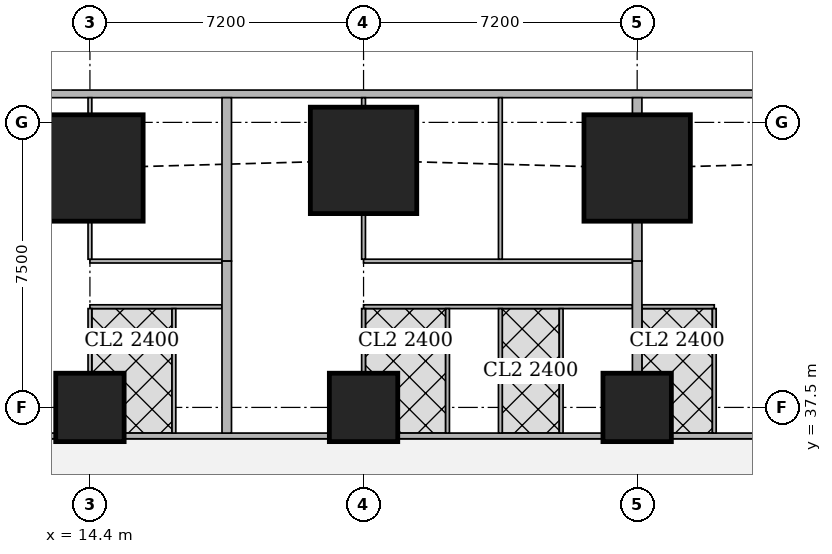
"""IFC4 building model, lengths in metres.
Left out: names, types, materials, properties, quantities, classifications, styles, units other than length and angle.
Written with IfcOpenShell. Run it as: python <this file> out.ifc"""

import sys

from ifc_helpers import new_model, si_unit, direction, frame, frame_2d, origin, origin_2d, place, context, subcontext, project, spatial, rectangle, extrude, element, fill, save


model = new_model("IFC4")
c1 = context("Model", 3, precision=1e-05, world=origin(), true_north=direction((0.0, 1.0)))
c2 = subcontext(c1, "Body", "Model", "MODEL_VIEW")
j1 = project(units=[si_unit("LENGTHUNIT", "METRE"), si_unit("PLANEANGLEUNIT", "RADIAN")], contexts=[c1])
p1 = place(None, origin())
s1 = spatial("IfcSite", under=j1, at=p1, CompositionType="ELEMENT")
p2 = place(p1, origin())
s2 = spatial("IfcBuilding", under=s1, at=p2, CompositionType="ELEMENT")
p3 = place(p2, frame((0.0, 0.0, 53.75)))
s3 = spatial("IfcBuildingStorey", under=s2, at=p3, CompositionType="ELEMENT", Elevation=53.75)
for number, where, z_axis, x_axis in (
    (1, (14.4, 37.5, 0.0), (0.0, 0.0, 1.0), (1.0, 0.0, 0.0)),
    (2, (21.6, 37.5, 0.0), (0.0, 0.0, 1.0), (1.0, 0.0, 0.0)),
    (3, (28.8, 37.5, 0.0), (0.0, 0.0, 1.0), (1.0, 0.0, 0.0)),
):
    element("IfcColumn", number, at=place(p3, frame(where, z_axis=z_axis, x_axis=x_axis)), inside=s3, PredefinedType="COLUMN", context=c2, shape_type="SweptSolid", body=[
        extrude(rectangle(XDim=1.8, YDim=1.8, at=origin_2d()), origin(), (0.0, 0.0, 1.0), 3.75),
    ])
for number, where, z_axis, x_axis in (
    (4, (14.4, 43.8, 0.0), (0.0, 0.0, 1.0), (1.0, 0.0, 0.0)),
    (5, (21.6, 44.0, 0.0), (0.0, 0.0, 1.0), (1.0, 0.0, 0.0)),
    (6, (28.8, 43.8, 0.0), (0.0, 0.0, 1.0), (1.0, 0.0, 0.0)),
):
    element("IfcColumn", number, at=place(p3, frame(where, z_axis=z_axis, x_axis=x_axis)), inside=s3, PredefinedType="COLUMN", context=c2, shape_type="SweptSolid", body=[
        extrude(rectangle(XDim=2.8, YDim=2.8, at=origin_2d()), origin(), (0.0, 0.0, 1.0), 3.75),
    ])
p4 = place(p3, frame((40.106, 45.75, 0.0), z_axis=(0.0, 0.0, 1.0), x_axis=(-1.0, 0.0, 0.0)))
e7 = element("IfcWall", 7, at=p4, inside=s3, PredefinedType="SOLIDWALL", context=c2, shape_type="SweptSolid", body=[
    extrude(rectangle(XDim=37.943, YDim=0.2, at=frame_2d((18.971, 0.0))), origin(), (0.0, 0.0, 1.0), 3.5),
])
p5 = place(p4, frame((8.606, 0.0, 0.9)))
e8 = element("IfcOpeningElement", 8, at=p5, cuts=e7, PredefinedType="OPENING", context=c2, shape_type="SweptSolid", body=[
    extrude(rectangle(XDim=1.8, YDim=1.5, at=frame_2d((0.9, 0.75))), frame((0.0, 0.11, 0.0), z_axis=(0.0, -1.0, 0.0), x_axis=(1.0, 0.0, 0.0)), (0.0, 0.0, 1.0), 0.22),
])
p6 = place(p4, frame((12.206, 0.0, 0.9)))
e9 = element("IfcOpeningElement", 9, at=p6, cuts=e7, PredefinedType="OPENING", context=c2, shape_type="SweptSolid", body=[
    extrude(rectangle(XDim=1.8, YDim=1.5, at=frame_2d((0.9, 0.75))), frame((0.0, 0.11, 0.0), z_axis=(0.0, -1.0, 0.0), x_axis=(1.0, 0.0, 0.0)), (0.0, 0.0, 1.0), 0.22),
])
p7 = place(p4, frame((15.806, 0.0, 0.9)))
e10 = element("IfcOpeningElement", 10, at=p7, cuts=e7, PredefinedType="OPENING", context=c2, shape_type="SweptSolid", body=[
    extrude(rectangle(XDim=1.8, YDim=1.5, at=frame_2d((0.9, 0.75))), frame((0.0, 0.11, 0.0), z_axis=(0.0, -1.0, 0.0), x_axis=(1.0, 0.0, 0.0)), (0.0, 0.0, 1.0), 0.22),
])
p8 = place(p4, frame((19.406, 0.0, 0.9)))
e11 = element("IfcOpeningElement", 11, at=p8, cuts=e7, PredefinedType="OPENING", context=c2, shape_type="SweptSolid", body=[
    extrude(rectangle(XDim=1.8, YDim=1.5, at=frame_2d((0.9, 0.75))), frame((0.0, 0.11, 0.0), z_axis=(0.0, -1.0, 0.0), x_axis=(1.0, 0.0, 0.0)), (0.0, 0.0, 1.0), 0.22),
])
p9 = place(p4, frame((23.006, 0.0, 0.9)))
e12 = element("IfcOpeningElement", 12, at=p9, cuts=e7, PredefinedType="OPENING", context=c2, shape_type="SweptSolid", body=[
    extrude(rectangle(XDim=1.8, YDim=1.5, at=frame_2d((0.9, 0.75))), frame((0.0, 0.11, 0.0), z_axis=(0.0, -1.0, 0.0), x_axis=(1.0, 0.0, 0.0)), (0.0, 0.0, 1.0), 0.22),
])
p10 = place(p4, frame((26.606, 0.0, 0.9)))
e13 = element("IfcOpeningElement", 13, at=p10, cuts=e7, PredefinedType="OPENING", context=c2, shape_type="SweptSolid", body=[
    extrude(rectangle(XDim=1.8, YDim=1.5, at=frame_2d((0.9, 0.75))), frame((0.0, 0.11, 0.0), z_axis=(0.0, -1.0, 0.0), x_axis=(1.0, 0.0, 0.0)), (0.0, 0.0, 1.0), 0.22),
])
p11 = place(p3, frame((8.1, 36.75, 0.0), z_axis=(0.0, 0.0, 1.0), x_axis=(1.0, 0.0, 0.0)))
e14 = element("IfcWall", 14, at=p11, inside=s3, PredefinedType="SOLIDWALL", context=c2, shape_type="SweptSolid", body=[
    extrude(rectangle(XDim=5.399, YDim=0.15, at=frame_2d((2.699, 0.0))), origin(), (0.0, 0.0, 1.0), 3.5),
])
p12 = place(p11, frame((2.725, 0.0, 0.0)))
e15 = element("IfcOpeningElement", 15, at=p12, cuts=e14, PredefinedType="OPENING", context=c2, shape_type="SweptSolid", body=[
    extrude(rectangle(XDim=1.0, YDim=2.1, at=frame_2d((0.5, 1.05))), frame((0.0, 0.085, 0.0), z_axis=(0.0, -1.0, 0.0), x_axis=(1.0, 0.0, 0.0)), (0.0, 0.0, 1.0), 0.17),
])
p13 = place(p3, frame((15.301, 36.75, 0.0), z_axis=(0.0, 0.0, 1.0), x_axis=(1.0, 0.0, 0.0)))
e16 = element("IfcWall", 16, at=p13, inside=s3, PredefinedType="SOLIDWALL", context=c2, shape_type="SweptSolid", body=[
    extrude(rectangle(XDim=5.398, YDim=0.15, at=frame_2d((2.699, 0.0))), origin(), (0.0, 0.0, 1.0), 3.5),
])
p14 = place(p13, frame((3.599, 0.0, 0.0)))
e17 = element("IfcOpeningElement", 17, at=p14, cuts=e16, PredefinedType="OPENING", context=c2, shape_type="SweptSolid", body=[
    extrude(rectangle(XDim=1.0, YDim=2.1, at=frame_2d((0.5, 1.05))), frame((0.0, 0.085, 0.0), z_axis=(0.0, -1.0, 0.0), x_axis=(1.0, 0.0, 0.0)), (0.0, 0.0, 1.0), 0.17),
])
p15 = place(p3, frame((22.501, 36.75, 0.0), z_axis=(0.0, 0.0, 1.0), x_axis=(1.0, 0.0, 0.0)))
e18 = element("IfcWall", 18, at=p15, inside=s3, PredefinedType="SOLIDWALL", context=c2, shape_type="SweptSolid", body=[
    extrude(rectangle(XDim=5.398, YDim=0.15, at=frame_2d((2.699, 0.0))), origin(), (0.0, 0.0, 1.0), 3.5),
])
p16 = place(p3, frame((29.701, 36.75, 0.0), z_axis=(0.0, 0.0, 1.0), x_axis=(1.0, 0.0, 0.0)))
e19 = element("IfcWall", 19, at=p16, inside=s3, PredefinedType="SOLIDWALL", context=c2, shape_type="SweptSolid", body=[
    extrude(rectangle(XDim=5.399, YDim=0.15, at=frame_2d((2.7, 0.0))), origin(), (0.0, 0.0, 1.0), 3.5),
])
p17 = place(p16, frame((2.745, 0.0, 0.0)))
e20 = element("IfcOpeningElement", 20, at=p17, cuts=e19, PredefinedType="OPENING", context=c2, shape_type="SweptSolid", body=[
    extrude(rectangle(XDim=1.0, YDim=2.1, at=frame_2d((0.5, 1.05))), frame((0.0, 0.085, 0.0), z_axis=(0.0, -1.0, 0.0), x_axis=(1.0, 0.0, 0.0)), (0.0, 0.0, 1.0), 0.17),
])
p18 = place(p3, frame((14.4, 41.35, 0.0), z_axis=(0.0, 0.0, 1.0), x_axis=(1.0, 0.0, 0.0)))
e21 = element("IfcWall", 21, at=p18, inside=s3, PredefinedType="PARTITIONING", context=c2, shape_type="SweptSolid", body=[
    extrude(rectangle(XDim=3.475, YDim=0.1, at=frame_2d((1.738, 0.0))), origin(), (0.0, 0.0, 1.0), 3.5),
])
p19 = place(p18, frame((1.45, 0.0, 0.0)))
e22 = element("IfcOpeningElement", 22, at=p19, cuts=e21, PredefinedType="OPENING", context=c2, shape_type="SweptSolid", body=[
    extrude(rectangle(XDim=0.9, YDim=2.1, at=frame_2d((0.45, 1.05))), frame((0.0, 0.06, 0.0), z_axis=(0.0, -1.0, 0.0), x_axis=(1.0, 0.0, 0.0)), (0.0, 0.0, 1.0), 0.12),
])
p20 = place(p3, frame((14.4, 40.15, 0.0), z_axis=(0.0, 0.0, 1.0), x_axis=(1.0, 0.0, 0.0)))
e23 = element("IfcWall", 23, at=p20, inside=s3, PredefinedType="PARTITIONING", context=c2, shape_type="SweptSolid", body=[
    extrude(rectangle(XDim=3.475, YDim=0.1, at=frame_2d((1.738, 0.0))), origin(), (0.0, 0.0, 1.0), 3.5),
])
p21 = place(p20, frame((0.655, 0.0, 0.0)))
e24 = element("IfcOpeningElement", 24, at=p21, cuts=e23, PredefinedType="OPENING", context=c2, shape_type="SweptSolid", body=[
    extrude(rectangle(XDim=0.9, YDim=2.1, at=frame_2d((0.45, 1.05))), frame((0.0, 0.06, 0.0), z_axis=(0.0, -1.0, 0.0), x_axis=(1.0, 0.0, 0.0)), (0.0, 0.0, 1.0), 0.12),
])
p22 = place(p20, frame((2.425, 0.0, 0.0)))
e25 = element("IfcOpeningElement", 25, at=p22, cuts=e23, PredefinedType="OPENING", context=c2, shape_type="SweptSolid", body=[
    extrude(rectangle(XDim=0.9, YDim=2.1, at=frame_2d((0.45, 1.05))), frame((0.0, 0.06, 0.0), z_axis=(0.0, -1.0, 0.0), x_axis=(1.0, 0.0, 0.0)), (0.0, 0.0, 1.0), 0.12),
])
p23 = place(p3, frame((14.4, 41.4, 0.0), z_axis=(0.0, 0.0, 1.0), x_axis=(0.0, 1.0, 0.0)))
e26 = element("IfcWall", 26, at=p23, inside=s3, PredefinedType="PARTITIONING", context=c2, shape_type="SweptSolid", body=[
    extrude(rectangle(XDim=0.999, YDim=0.1, at=frame_2d((0.5, 0.0))), origin(), (0.0, 0.0, 1.0), 3.5),
])
p24 = place(p3, frame((14.4, 45.201, 0.0), z_axis=(0.0, 0.0, 1.0), x_axis=(0.0, 1.0, 0.0)))
e27 = element("IfcWall", 27, at=p24, inside=s3, PredefinedType="PARTITIONING", context=c2, shape_type="SweptSolid", body=[
    extrude(rectangle(XDim=0.449, YDim=0.1, at=frame_2d((0.225, 0.0))), origin(), (0.0, 0.0, 1.0), 3.5),
])
p25 = place(p3, frame((14.4, 38.401, 0.0), z_axis=(0.0, 0.0, 1.0), x_axis=(0.0, 1.0, 0.0)))
e28 = element("IfcWall", 28, at=p25, inside=s3, PredefinedType="PARTITIONING", context=c2, shape_type="SweptSolid", body=[
    extrude(rectangle(XDim=1.699, YDim=0.1, at=frame_2d((0.85, 0.0))), origin(), (0.0, 0.0, 1.0), 3.5),
])
p26 = place(p3, frame((16.61, 36.825, 0.0), z_axis=(0.0, 0.0, 1.0), x_axis=(0.0, 1.0, 0.0)))
e29 = element("IfcWall", 29, at=p26, inside=s3, PredefinedType="PARTITIONING", context=c2, shape_type="SweptSolid", body=[
    extrude(rectangle(XDim=3.275, YDim=0.1, at=frame_2d((1.638, 0.0))), origin(), (0.0, 0.0, 1.0), 3.5),
])
p27 = place(p3, frame((21.6, 41.35, 0.0), z_axis=(0.0, 0.0, 1.0), x_axis=(1.0, 0.0, 0.0)))
e30 = element("IfcWall", 30, at=p27, inside=s3, PredefinedType="PARTITIONING", context=c2, shape_type="SweptSolid", body=[
    extrude(rectangle(XDim=7.075, YDim=0.1, at=frame_2d((3.538, 0.0))), origin(), (0.0, 0.0, 1.0), 3.5),
])
p28 = place(p27, frame((1.45, 0.0, 0.0)))
e31 = element("IfcOpeningElement", 31, at=p28, cuts=e30, PredefinedType="OPENING", context=c2, shape_type="SweptSolid", body=[
    extrude(rectangle(XDim=0.9, YDim=2.1, at=frame_2d((0.45, 1.05))), frame((0.0, 0.06, 0.0), z_axis=(0.0, -1.0, 0.0), x_axis=(1.0, 0.0, 0.0)), (0.0, 0.0, 1.0), 0.12),
])
p29 = place(p27, frame((3.8, 0.0, 0.0)))
e32 = element("IfcOpeningElement", 32, at=p29, cuts=e30, PredefinedType="OPENING", context=c2, shape_type="SweptSolid", body=[
    extrude(rectangle(XDim=0.9, YDim=2.1, at=frame_2d((0.45, 1.05))), frame((0.0, 0.06, 0.0), z_axis=(0.0, -1.0, 0.0), x_axis=(1.0, 0.0, 0.0)), (0.0, 0.0, 1.0), 0.12),
])
p30 = place(p3, frame((21.6, 40.15, 0.0), z_axis=(0.0, 0.0, 1.0), x_axis=(1.0, 0.0, 0.0)))
e33 = element("IfcWall", 33, at=p30, inside=s3, PredefinedType="PARTITIONING", context=c2, shape_type="SweptSolid", body=[
    extrude(rectangle(XDim=7.075, YDim=0.1, at=frame_2d((3.538, 0.0))), origin(), (0.0, 0.0, 1.0), 3.5),
])
p31 = place(p30, frame((0.655, 0.0, 0.0)))
e34 = element("IfcOpeningElement", 34, at=p31, cuts=e33, PredefinedType="OPENING", context=c2, shape_type="SweptSolid", body=[
    extrude(rectangle(XDim=0.9, YDim=2.1, at=frame_2d((0.45, 1.05))), frame((0.0, 0.06, 0.0), z_axis=(0.0, -1.0, 0.0), x_axis=(1.0, 0.0, 0.0)), (0.0, 0.0, 1.0), 0.12),
])
p32 = place(p30, frame((3.95, 0.0, 0.0)))
e35 = element("IfcOpeningElement", 35, at=p32, cuts=e33, PredefinedType="OPENING", context=c2, shape_type="SweptSolid", body=[
    extrude(rectangle(XDim=0.9, YDim=2.1, at=frame_2d((0.45, 1.05))), frame((0.0, 0.06, 0.0), z_axis=(0.0, -1.0, 0.0), x_axis=(1.0, 0.0, 0.0)), (0.0, 0.0, 1.0), 0.12),
])
p33 = place(p30, frame((2.455, 0.0, 0.0)))
e36 = element("IfcOpeningElement", 36, at=p33, cuts=e33, PredefinedType="OPENING", context=c2, shape_type="SweptSolid", body=[
    extrude(rectangle(XDim=0.9, YDim=2.1, at=frame_2d((0.45, 1.05))), frame((0.0, 0.06, 0.0), z_axis=(0.0, -1.0, 0.0), x_axis=(1.0, 0.0, 0.0)), (0.0, 0.0, 1.0), 0.12),
])
p34 = place(p30, frame((5.75, 0.0, 0.0)))
e37 = element("IfcOpeningElement", 37, at=p34, cuts=e33, PredefinedType="OPENING", context=c2, shape_type="SweptSolid", body=[
    extrude(rectangle(XDim=0.9, YDim=2.1, at=frame_2d((0.45, 1.05))), frame((0.0, 0.06, 0.0), z_axis=(0.0, -1.0, 0.0), x_axis=(1.0, 0.0, 0.0)), (0.0, 0.0, 1.0), 0.12),
])
p35 = place(p3, frame((21.6, 41.4, 0.0), z_axis=(0.0, 0.0, 1.0), x_axis=(0.0, 1.0, 0.0)))
e38 = element("IfcWall", 38, at=p35, inside=s3, PredefinedType="PARTITIONING", context=c2, shape_type="SweptSolid", body=[
    extrude(rectangle(XDim=1.199, YDim=0.1, at=frame_2d((0.6, 0.0))), origin(), (0.0, 0.0, 1.0), 3.5),
])
p36 = place(p3, frame((21.6, 45.401, 0.0), z_axis=(0.0, 0.0, 1.0), x_axis=(0.0, 1.0, 0.0)))
e39 = element("IfcWall", 39, at=p36, inside=s3, PredefinedType="PARTITIONING", context=c2, shape_type="SweptSolid", body=[
    extrude(rectangle(XDim=0.249, YDim=0.1, at=frame_2d((0.125, 0.0))), origin(), (0.0, 0.0, 1.0), 3.5),
])
p37 = place(p3, frame((25.2, 41.4, 0.0), z_axis=(0.0, 0.0, 1.0), x_axis=(0.0, 1.0, 0.0)))
e40 = element("IfcWall", 40, at=p37, inside=s3, PredefinedType="PARTITIONING", context=c2, shape_type="SweptSolid", body=[
    extrude(rectangle(XDim=4.25, YDim=0.1, at=frame_2d((2.125, 0.0))), origin(), (0.0, 0.0, 1.0), 2.05),
])
p38 = place(p3, frame((21.6, 38.401, 0.0), z_axis=(0.0, 0.0, 1.0), x_axis=(0.0, 1.0, 0.0)))
e41 = element("IfcWall", 41, at=p38, inside=s3, PredefinedType="PARTITIONING", context=c2, shape_type="SweptSolid", body=[
    extrude(rectangle(XDim=1.699, YDim=0.1, at=frame_2d((0.85, 0.0))), origin(), (0.0, 0.0, 1.0), 3.5),
])
for number, where, z_axis, x_axis in (
    (42, (25.2, 36.825, 0.0), (0.0, 0.0, 1.0), (0.0, 1.0, 0.0)),
    (43, (23.81, 36.825, 0.0), (0.0, 0.0, 1.0), (0.0, 1.0, 0.0)),
    (44, (26.8, 36.825, 0.0), (0.0, 0.0, 1.0), (0.0, 1.0, 0.0)),
):
    element("IfcWall", number, at=place(p3, frame(where, z_axis=z_axis, x_axis=x_axis)), inside=s3, PredefinedType="PARTITIONING", context=c2, shape_type="SweptSolid", body=[
        extrude(rectangle(XDim=3.275, YDim=0.1, at=frame_2d((1.638, 0.0))), origin(), (0.0, 0.0, 1.0), 3.5),
    ])
p39 = place(p3, frame((18.0, 41.35, 0.0), z_axis=(0.0, 0.0, 1.0), x_axis=(0.0, 1.0, 0.0)))
e45 = element("IfcWall", 45, at=p39, inside=s3, PredefinedType="SOLIDWALL", context=c2, shape_type="SweptSolid", body=[
    extrude(rectangle(XDim=4.3, YDim=0.25, at=frame_2d((2.15, 0.0))), origin(), (0.0, 0.0, 1.0), 2.05),
])
p40 = place(p3, frame((18.0, 36.825, 0.0), z_axis=(0.0, 0.0, 1.0), x_axis=(0.0, 1.0, 0.0)))
e46 = element("IfcWall", 46, at=p40, inside=s3, PredefinedType="SOLIDWALL", context=c2, shape_type="SweptSolid", body=[
    extrude(rectangle(XDim=4.525, YDim=0.25, at=frame_2d((2.263, 0.0))), origin(), (0.0, 0.0, 1.0), 3.5),
])
p41 = place(p3, frame((28.925, 40.15, 0.0), z_axis=(0.0, 0.0, 1.0), x_axis=(1.0, 0.0, 0.0)))
e47 = element("IfcWall", 47, at=p41, inside=s3, PredefinedType="PARTITIONING", context=c2, shape_type="SweptSolid", body=[
    extrude(rectangle(XDim=1.904, YDim=0.1, at=frame_2d((0.952, 0.0))), origin(), (0.0, 0.0, 1.0), 3.5),
])
p42 = place(p41, frame((0.425, 0.0, 0.0)))
e48 = element("IfcOpeningElement", 48, at=p42, cuts=e47, PredefinedType="OPENING", context=c2, shape_type="SweptSolid", body=[
    extrude(rectangle(XDim=0.9, YDim=2.1, at=frame_2d((0.45, 1.05))), frame((0.0, 0.06, 0.0), z_axis=(0.0, -1.0, 0.0), x_axis=(1.0, 0.0, 0.0)), (0.0, 0.0, 1.0), 0.12),
])
p43 = place(p3, frame((30.829, 36.825, 0.0), z_axis=(0.0, 0.0, 1.0), x_axis=(0.0, 1.0, 0.0)))
e49 = element("IfcWall", 49, at=p43, inside=s3, PredefinedType="PARTITIONING", context=c2, shape_type="SweptSolid", body=[
    extrude(rectangle(XDim=3.275, YDim=0.1, at=frame_2d((1.638, 0.0))), origin(), (0.0, 0.0, 1.0), 3.5),
])
p44 = place(p3, frame((28.8, 41.35, 0.0), z_axis=(0.0, 0.0, 1.0), x_axis=(0.0, 1.0, 0.0)))
e50 = element("IfcWall", 50, at=p44, inside=s3, PredefinedType="SOLIDWALL", context=c2, shape_type="SweptSolid", body=[
    extrude(rectangle(XDim=1.049, YDim=0.25, at=frame_2d((0.524, 0.0))), origin(), (0.0, 0.0, 1.0), 3.5),
])
p45 = place(p3, frame((28.8, 45.201, 0.0), z_axis=(0.0, 0.0, 1.0), x_axis=(0.0, 1.0, 0.0)))
e51 = element("IfcWall", 51, at=p45, inside=s3, PredefinedType="SOLIDWALL", context=c2, shape_type="SweptSolid", body=[
    extrude(rectangle(XDim=0.449, YDim=0.25, at=frame_2d((0.225, 0.0))), origin(), (0.0, 0.0, 1.0), 3.5),
])
p46 = place(p3, frame((28.8, 38.401, 0.0), z_axis=(0.0, 0.0, 1.0), x_axis=(0.0, 1.0, 0.0)))
e52 = element("IfcWall", 52, at=p46, inside=s3, PredefinedType="SOLIDWALL", context=c2, shape_type="SweptSolid", body=[
    extrude(rectangle(XDim=2.949, YDim=0.25, at=frame_2d((1.475, 0.0))), origin(), (0.0, 0.0, 1.0), 3.5),
])
p47 = place(p5, origin())
e53 = element("IfcWindow", 53, at=p47, inside=s3, PartitioningType="SINGLE_PANEL", PredefinedType="WINDOW", context=c2, shape_type="SweptSolid", body=[
    extrude(rectangle(XDim=1.8, YDim=1.5, at=frame_2d((0.9, 0.75))), frame((0.0, 0.03, 0.0), z_axis=(0.0, -1.0, 0.0), x_axis=(1.0, 0.0, 0.0)), (0.0, 0.0, 1.0), 0.06),
])
fill(e8, e53)
p48 = place(p6, origin())
e54 = element("IfcWindow", 54, at=p48, inside=s3, PartitioningType="SINGLE_PANEL", PredefinedType="WINDOW", context=c2, shape_type="SweptSolid", body=[
    extrude(rectangle(XDim=1.8, YDim=1.5, at=frame_2d((0.9, 0.75))), frame((0.0, 0.03, 0.0), z_axis=(0.0, -1.0, 0.0), x_axis=(1.0, 0.0, 0.0)), (0.0, 0.0, 1.0), 0.06),
])
fill(e9, e54)
p49 = place(p7, origin())
e55 = element("IfcWindow", 55, at=p49, inside=s3, PartitioningType="SINGLE_PANEL", PredefinedType="WINDOW", context=c2, shape_type="SweptSolid", body=[
    extrude(rectangle(XDim=1.8, YDim=1.5, at=frame_2d((0.9, 0.75))), frame((0.0, 0.03, 0.0), z_axis=(0.0, -1.0, 0.0), x_axis=(1.0, 0.0, 0.0)), (0.0, 0.0, 1.0), 0.06),
])
fill(e10, e55)
p50 = place(p8, origin())
e56 = element("IfcWindow", 56, at=p50, inside=s3, PartitioningType="SINGLE_PANEL", PredefinedType="WINDOW", context=c2, shape_type="SweptSolid", body=[
    extrude(rectangle(XDim=1.8, YDim=1.5, at=frame_2d((0.9, 0.75))), frame((0.0, 0.03, 0.0), z_axis=(0.0, -1.0, 0.0), x_axis=(1.0, 0.0, 0.0)), (0.0, 0.0, 1.0), 0.06),
])
fill(e11, e56)
p51 = place(p9, origin())
e57 = element("IfcWindow", 57, at=p51, inside=s3, PartitioningType="SINGLE_PANEL", PredefinedType="WINDOW", context=c2, shape_type="SweptSolid", body=[
    extrude(rectangle(XDim=1.8, YDim=1.5, at=frame_2d((0.9, 0.75))), frame((0.0, 0.03, 0.0), z_axis=(0.0, -1.0, 0.0), x_axis=(1.0, 0.0, 0.0)), (0.0, 0.0, 1.0), 0.06),
])
fill(e12, e57)
p52 = place(p10, origin())
e58 = element("IfcWindow", 58, at=p52, inside=s3, PartitioningType="SINGLE_PANEL", PredefinedType="WINDOW", context=c2, shape_type="SweptSolid", body=[
    extrude(rectangle(XDim=1.8, YDim=1.5, at=frame_2d((0.9, 0.75))), frame((0.0, 0.03, 0.0), z_axis=(0.0, -1.0, 0.0), x_axis=(1.0, 0.0, 0.0)), (0.0, 0.0, 1.0), 0.06),
])
fill(e13, e58)
p53 = place(p19, origin())
e59 = element("IfcDoor", 59, at=p53, inside=s3, OperationType="SINGLE_SWING_RIGHT", PredefinedType="DOOR", context=c2, shape_type="SweptSolid", body=[
    extrude(rectangle(XDim=0.9, YDim=2.1, at=frame_2d((0.45, 1.05))), frame((0.0, 0.025, 0.0), z_axis=(0.0, -1.0, 0.0), x_axis=(1.0, 0.0, 0.0)), (0.0, 0.0, 1.0), 0.05),
])
fill(e22, e59)
p54 = place(p21, origin())
e60 = element("IfcDoor", 60, at=p54, inside=s3, OperationType="SINGLE_SWING_RIGHT", PredefinedType="DOOR", context=c2, shape_type="SweptSolid", body=[
    extrude(rectangle(XDim=0.9, YDim=2.1, at=frame_2d((0.45, 1.05))), frame((0.0, 0.025, 0.0), z_axis=(0.0, -1.0, 0.0), x_axis=(1.0, 0.0, 0.0)), (0.0, 0.0, 1.0), 0.05),
])
fill(e24, e60)
p55 = place(p22, origin())
e61 = element("IfcDoor", 61, at=p55, inside=s3, OperationType="SINGLE_SWING_LEFT", PredefinedType="DOOR", context=c2, shape_type="SweptSolid", body=[
    extrude(rectangle(XDim=0.9, YDim=2.1, at=frame_2d((0.45, 1.05))), frame((0.0, 0.025, 0.0), z_axis=(0.0, -1.0, 0.0), x_axis=(1.0, 0.0, 0.0)), (0.0, 0.0, 1.0), 0.05),
])
fill(e25, e61)
p56 = place(p28, origin())
e62 = element("IfcDoor", 62, at=p56, inside=s3, OperationType="SINGLE_SWING_LEFT", PredefinedType="DOOR", context=c2, shape_type="SweptSolid", body=[
    extrude(rectangle(XDim=0.9, YDim=2.1, at=frame_2d((0.45, 1.05))), frame((0.0, 0.025, 0.0), z_axis=(0.0, -1.0, 0.0), x_axis=(1.0, 0.0, 0.0)), (0.0, 0.0, 1.0), 0.05),
])
fill(e31, e62)
p57 = place(p29, origin())
e63 = element("IfcDoor", 63, at=p57, inside=s3, OperationType="SINGLE_SWING_LEFT", PredefinedType="DOOR", context=c2, shape_type="SweptSolid", body=[
    extrude(rectangle(XDim=0.9, YDim=2.1, at=frame_2d((0.45, 1.05))), frame((0.0, 0.025, 0.0), z_axis=(0.0, -1.0, 0.0), x_axis=(1.0, 0.0, 0.0)), (0.0, 0.0, 1.0), 0.05),
])
fill(e32, e63)
p58 = place(p31, origin())
e64 = element("IfcDoor", 64, at=p58, inside=s3, OperationType="SINGLE_SWING_RIGHT", PredefinedType="DOOR", context=c2, shape_type="SweptSolid", body=[
    extrude(rectangle(XDim=0.9, YDim=2.1, at=frame_2d((0.45, 1.05))), frame((0.0, 0.025, 0.0), z_axis=(0.0, -1.0, 0.0), x_axis=(1.0, 0.0, 0.0)), (0.0, 0.0, 1.0), 0.05),
])
fill(e34, e64)
p59 = place(p32, origin())
e65 = element("IfcDoor", 65, at=p59, inside=s3, OperationType="SINGLE_SWING_LEFT", PredefinedType="DOOR", context=c2, shape_type="SweptSolid", body=[
    extrude(rectangle(XDim=0.9, YDim=2.1, at=frame_2d((0.45, 1.05))), frame((0.0, 0.025, 0.0), z_axis=(0.0, -1.0, 0.0), x_axis=(1.0, 0.0, 0.0)), (0.0, 0.0, 1.0), 0.05),
])
fill(e35, e65)
p60 = place(p33, origin())
e66 = element("IfcDoor", 66, at=p60, inside=s3, OperationType="SINGLE_SWING_LEFT", PredefinedType="DOOR", context=c2, shape_type="SweptSolid", body=[
    extrude(rectangle(XDim=0.9, YDim=2.1, at=frame_2d((0.45, 1.05))), frame((0.0, 0.025, 0.0), z_axis=(0.0, -1.0, 0.0), x_axis=(1.0, 0.0, 0.0)), (0.0, 0.0, 1.0), 0.05),
])
fill(e36, e66)
p61 = place(p34, origin())
e67 = element("IfcDoor", 67, at=p61, inside=s3, OperationType="SINGLE_SWING_LEFT", PredefinedType="DOOR", context=c2, shape_type="SweptSolid", body=[
    extrude(rectangle(XDim=0.9, YDim=2.1, at=frame_2d((0.45, 1.05))), frame((0.0, 0.025, 0.0), z_axis=(0.0, -1.0, 0.0), x_axis=(1.0, 0.0, 0.0)), (0.0, 0.0, 1.0), 0.05),
])
fill(e37, e67)
p62 = place(p14, origin())
e68 = element("IfcDoor", 68, at=p62, inside=s3, OperationType="SINGLE_SWING_RIGHT", PredefinedType="DOOR", context=c2, shape_type="SweptSolid", body=[
    extrude(rectangle(XDim=1.0, YDim=2.1, at=frame_2d((0.5, 1.05))), frame((0.0, 0.025, 0.0), z_axis=(0.0, -1.0, 0.0), x_axis=(1.0, 0.0, 0.0)), (0.0, 0.0, 1.0), 0.05),
])
fill(e17, e68)
p63 = place(p42, origin())
e69 = element("IfcDoor", 69, at=p63, inside=s3, OperationType="SINGLE_SWING_RIGHT", PredefinedType="DOOR", context=c2, shape_type="SweptSolid", body=[
    extrude(rectangle(XDim=0.9, YDim=2.1, at=frame_2d((0.45, 1.05))), frame((0.0, 0.025, 0.0), z_axis=(0.0, -1.0, 0.0), x_axis=(1.0, 0.0, 0.0)), (0.0, 0.0, 1.0), 0.05),
])
fill(e48, e69)
save(model, sys.argv[1])
